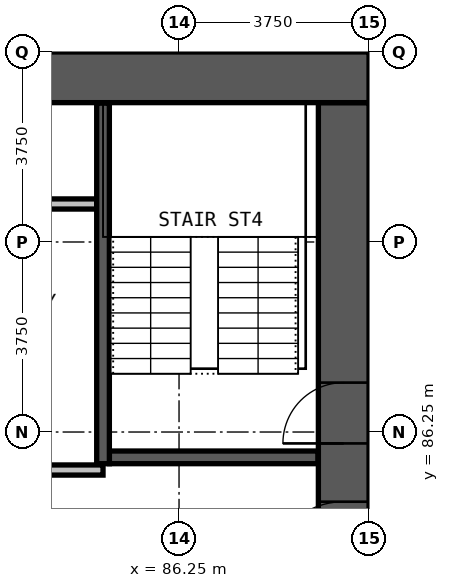
"""IFC4 building model, lengths in metres.
Left out: names, types, materials, properties, quantities, classifications, styles, units other than length and angle.
Written with IfcOpenShell. Run it as: python <this file> out.ifc"""

import sys

from ifc_helpers import new_model, si_unit, direction, frame, frame_2d, origin, place, context, subcontext, project, spatial, rectangle, extrude, element, fill, save


model = new_model("IFC4")
c1 = context("Model", 3, precision=1e-05, world=origin(), true_north=direction((0.0, 1.0)))
c2 = subcontext(c1, "Body", "Model", "MODEL_VIEW")
j1 = project(units=[si_unit("LENGTHUNIT", "METRE"), si_unit("PLANEANGLEUNIT", "RADIAN")], contexts=[c1])
p1 = place(None, origin())
s1 = spatial("IfcSite", under=j1, at=p1, CompositionType="ELEMENT")
p2 = place(p1, origin())
s2 = spatial("IfcBuilding", under=s1, at=p2, CompositionType="ELEMENT")
p3 = place(p2, frame((0.0, 0.0, 95.6)))
s3 = spatial("IfcBuildingStorey", under=s2, at=p3, CompositionType="ELEMENT", Elevation=95.6)
p4 = place(p3, frame((89.5, 72.25, 0.0), z_axis=(0.0, 0.0, 1.0), x_axis=(0.0, 1.0, 0.0)))
e1 = element("IfcWall", 1, at=p4, inside=s3, PredefinedType="SHEAR", context=c2, shape_type="SweptSolid", body=[
    extrude(rectangle(XDim=20.5, YDim=1.0, at=frame_2d((10.25, 0.0))), origin(), (0.0, 0.0, 1.0), 3.3),
])
p5 = place(p4, frame((0.275, 0.0, 0.0)))
e2 = element("IfcOpeningElement", 2, at=p5, cuts=e1, PredefinedType="OPENING", context=c2, shape_type="SweptSolid", body=[
    extrude(rectangle(XDim=1.2, YDim=2.2, at=frame_2d((0.6, 1.1))), frame((0.0, 0.51, 0.0), z_axis=(0.0, -1.0, 0.0), x_axis=(1.0, 0.0, 0.0)), (0.0, 0.0, 1.0), 1.02),
])
p6 = place(p4, frame((13.775, 0.0, 0.0)))
e3 = element("IfcOpeningElement", 3, at=p6, cuts=e1, PredefinedType="OPENING", context=c2, shape_type="SweptSolid", body=[
    extrude(rectangle(XDim=1.2, YDim=2.2, at=frame_2d((0.6, 1.1))), frame((0.0, 0.51, 0.0), z_axis=(0.0, -1.0, 0.0), x_axis=(1.0, 0.0, 0.0)), (0.0, 0.0, 1.0), 1.02),
])
p7 = place(p4, frame((7.875, 0.0, 0.0)))
e4 = element("IfcOpeningElement", 4, at=p7, cuts=e1, PredefinedType="OPENING", context=c2, shape_type="SweptSolid", body=[
    extrude(rectangle(XDim=1.5, YDim=2.2, at=frame_2d((0.75, 1.1))), frame((0.0, 0.51, 0.0), z_axis=(0.0, -1.0, 0.0), x_axis=(1.0, 0.0, 0.0)), (0.0, 0.0, 1.0), 1.02),
])
p8 = place(p4, frame((11.125, 0.0, 0.0)))
e5 = element("IfcOpeningElement", 5, at=p8, cuts=e1, PredefinedType="OPENING", context=c2, shape_type="SweptSolid", body=[
    extrude(rectangle(XDim=1.5, YDim=2.2, at=frame_2d((0.75, 1.1))), frame((0.0, 0.51, 0.0), z_axis=(0.0, -1.0, 0.0), x_axis=(1.0, 0.0, 0.0)), (0.0, 0.0, 1.0), 1.02),
])
p9 = place(p3, frame((90.0, 93.25, 0.0), z_axis=(0.0, 0.0, 1.0), x_axis=(-1.0, 0.0, 0.0)))
e6 = element("IfcWall", 6, at=p9, inside=s3, PredefinedType="SHEAR", context=c2, shape_type="SweptSolid", body=[
    extrude(rectangle(XDim=30.0, YDim=1.0, at=frame_2d((15.0, 0.0))), origin(), (0.0, 0.0, 1.0), 3.3),
])
p10 = place(p3, frame((75.1, 85.5, 0.0), z_axis=(0.0, 0.0, 1.0), x_axis=(1.0, 0.0, 0.0)))
e7 = element("IfcWall", 7, at=p10, inside=s3, PredefinedType="PARTITIONING", context=c2, shape_type="SweptSolid", body=[
    extrude(rectangle(XDim=9.65, YDim=0.2, at=frame_2d((4.825, 0.0))), origin(), (0.0, 0.0, 1.0), 3.0),
])
p11 = place(p10, frame((1.0, 0.0, 0.0)))
e8 = element("IfcOpeningElement", 8, at=p11, cuts=e7, PredefinedType="OPENING", context=c2, shape_type="SweptSolid", body=[
    extrude(rectangle(XDim=0.9, YDim=2.2, at=frame_2d((0.45, 1.1))), frame((0.0, 0.11, 0.0), z_axis=(0.0, -1.0, 0.0), x_axis=(1.0, 0.0, 0.0)), (0.0, 0.0, 1.0), 0.22),
])
p12 = place(p10, frame((4.2, 0.0, 0.0)))
e9 = element("IfcOpeningElement", 9, at=p12, cuts=e7, PredefinedType="OPENING", context=c2, shape_type="SweptSolid", body=[
    extrude(rectangle(XDim=0.9, YDim=2.2, at=frame_2d((0.45, 1.1))), frame((0.0, 0.11, 0.0), z_axis=(0.0, -1.0, 0.0), x_axis=(1.0, 0.0, 0.0)), (0.0, 0.0, 1.0), 0.22),
])
p13 = place(p10, frame((7.55, 0.0, 0.0)))
e10 = element("IfcOpeningElement", 10, at=p13, cuts=e7, PredefinedType="OPENING", context=c2, shape_type="SweptSolid", body=[
    extrude(rectangle(XDim=0.9, YDim=2.2, at=frame_2d((0.45, 1.1))), frame((0.0, 0.11, 0.0), z_axis=(0.0, -1.0, 0.0), x_axis=(1.0, 0.0, 0.0)), (0.0, 0.0, 1.0), 0.22),
])
p14 = place(p3, frame((75.26, 90.75, 0.0), z_axis=(0.0, 0.0, 1.0), x_axis=(1.0, 0.0, 0.0)))
e11 = element("IfcWall", 11, at=p14, inside=s3, PredefinedType="PARTITIONING", context=c2, shape_type="SweptSolid", body=[
    extrude(rectangle(XDim=9.365, YDim=0.2, at=frame_2d((4.683, 0.0))), origin(), (0.0, 0.0, 1.0), 3.0),
])
p15 = place(p3, frame((84.875, 85.75, 0.0), z_axis=(0.0, 0.0, 1.0), x_axis=(1.0, 0.0, 0.0)))
e12 = element("IfcWall", 12, at=p15, inside=s3, PredefinedType="PARTITIONING", context=c2, shape_type="SweptSolid", body=[
    extrude(rectangle(XDim=4.115, YDim=0.25, at=frame_2d((2.058, 0.0))), origin(), (0.0, 0.0, 1.0), 3.0),
])
p16 = place(p3, frame((84.75, 85.625, 0.0), z_axis=(0.0, 0.0, 1.0), x_axis=(0.0, 1.0, 0.0)))
e13 = element("IfcWall", 13, at=p16, inside=s3, PredefinedType="PARTITIONING", context=c2, shape_type="SweptSolid", body=[
    extrude(rectangle(XDim=7.115, YDim=0.25, at=frame_2d((3.558, 0.0))), origin(), (0.0, 0.0, 1.0), 3.0),
])
p17 = place(p6, origin())
e14 = element("IfcDoor", 14, at=p17, inside=s3, OperationType="SINGLE_SWING_RIGHT", PredefinedType="DOOR", context=c2, shape_type="SweptSolid", body=[
    extrude(rectangle(XDim=1.2, YDim=2.2, at=frame_2d((0.6, 1.1))), frame((0.0, 0.025, 0.0), z_axis=(0.0, -1.0, 0.0), x_axis=(1.0, 0.0, 0.0)), (0.0, 0.0, 1.0), 0.05),
])
fill(e3, e14)
p18 = place(p8, origin())
e15 = element("IfcDoor", 15, at=p18, inside=s3, OperationType="DOUBLE_DOOR_SINGLE_SWING", PredefinedType="DOOR", context=c2, shape_type="SweptSolid", body=[
    extrude(rectangle(XDim=1.5, YDim=2.2, at=frame_2d((0.75, 1.1))), frame((0.0, 0.025, 0.0), z_axis=(0.0, -1.0, 0.0), x_axis=(1.0, 0.0, 0.0)), (0.0, 0.0, 1.0), 0.05),
])
fill(e5, e15)
save(model, sys.argv[1])
